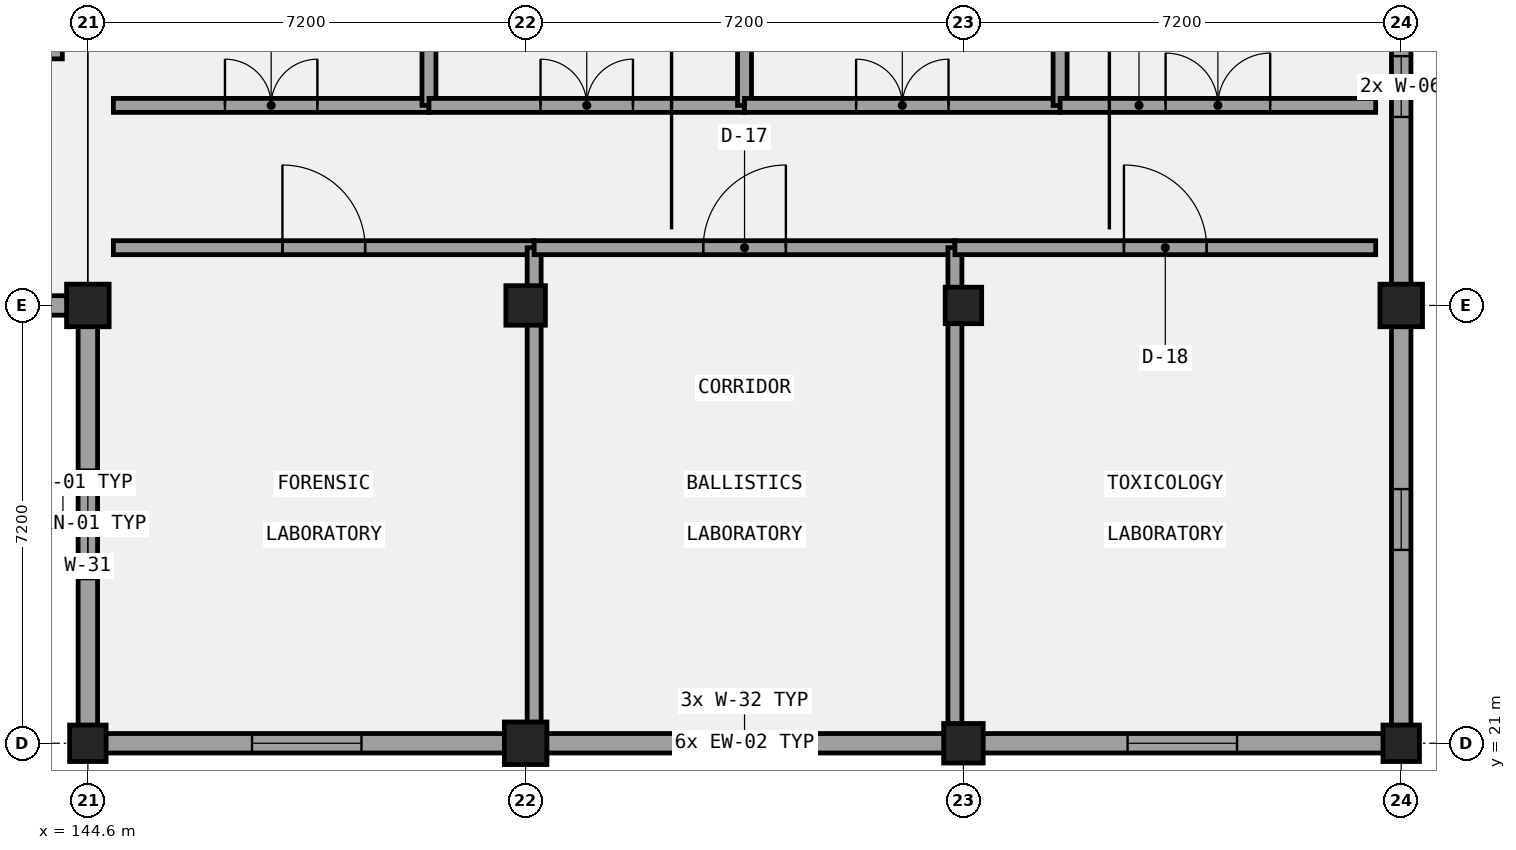
"""IFC4 building model, lengths in metres.
Left out: names, types, materials, properties, quantities, classifications, styles, units other than length and angle.
Written with IfcOpenShell. Run it as: python <this file> out.ifc"""

import sys

from ifc_helpers import new_model, si_unit, direction, frame, frame_2d, origin, origin_2d, place, context, subcontext, project, spatial, rectangle, extrude, element, fill, save


model = new_model("IFC4")
c1 = context("Model", 3, precision=1e-05, world=origin(), true_north=direction((0.0, 1.0)))
c2 = subcontext(c1, "Body", "Model", "MODEL_VIEW")
j1 = project(units=[si_unit("LENGTHUNIT", "METRE"), si_unit("PLANEANGLEUNIT", "RADIAN")], contexts=[c1])
p1 = place(None, origin())
s1 = spatial("IfcSite", under=j1, at=p1, CompositionType="ELEMENT")
p2 = place(p1, origin())
s2 = spatial("IfcBuilding", under=s1, at=p2, CompositionType="ELEMENT")
p3 = place(p2, frame((0.0, 0.0, 9.6)))
s3 = spatial("IfcBuildingStorey", under=s2, at=p3, CompositionType="ELEMENT", Elevation=9.6)
p4 = place(p3, frame((144.6, 21.0, 0.0), z_axis=(0.0, 0.0, 1.0), x_axis=(1.0, 0.0, 0.0)))
e1 = element("IfcColumn", 1, at=p4, inside=s3, PredefinedType="COLUMN", context=c2, shape_type="SweptSolid", body=[
    extrude(rectangle(XDim=0.6, YDim=0.6, at=origin_2d()), origin(), (0.0, 0.0, 1.0), 4.2),
])
for number, where, z_axis, x_axis in (
    (2, (144.6, 28.2, 0.0), (0.0, 0.0, 1.0), (1.0, 0.0, 0.0)),
    (3, (151.8, 21.0, 0.0), (0.0, 0.0, 1.0), (1.0, 0.0, 0.0)),
):
    element("IfcColumn", number, at=place(p3, frame(where, z_axis=z_axis, x_axis=x_axis)), inside=s3, PredefinedType="COLUMN", context=c2, shape_type="SweptSolid", body=[
        extrude(rectangle(XDim=0.7, YDim=0.7, at=origin_2d()), origin(), (0.0, 0.0, 1.0), 4.2),
    ])
for number, where, z_axis, x_axis in (
    (4, (151.8, 28.2, 0.0), (0.0, 0.0, 1.0), (1.0, 0.0, 0.0)),
    (5, (159.0, 21.0, 0.0), (0.0, 0.0, 1.0), (1.0, 0.0, 0.0)),
):
    element("IfcColumn", number, at=place(p3, frame(where, z_axis=z_axis, x_axis=x_axis)), inside=s3, PredefinedType="COLUMN", context=c2, shape_type="SweptSolid", body=[
        extrude(rectangle(XDim=0.65, YDim=0.65, at=origin_2d()), origin(), (0.0, 0.0, 1.0), 4.2),
    ])
for number, where, z_axis, x_axis in (
    (6, (159.0, 28.2, 0.0), (0.0, 0.0, 1.0), (1.0, 0.0, 0.0)),
    (7, (166.2, 21.0, 0.0), (0.0, 0.0, 1.0), (1.0, 0.0, 0.0)),
):
    element("IfcColumn", number, at=place(p3, frame(where, z_axis=z_axis, x_axis=x_axis)), inside=s3, PredefinedType="COLUMN", context=c2, shape_type="SweptSolid", body=[
        extrude(rectangle(XDim=0.6, YDim=0.6, at=origin_2d()), origin(), (0.0, 0.0, 1.0), 4.2),
    ])
p5 = place(p3, frame((166.2, 28.2, 0.0), z_axis=(0.0, 0.0, 1.0), x_axis=(1.0, 0.0, 0.0)))
e8 = element("IfcColumn", 8, at=p5, inside=s3, PredefinedType="COLUMN", context=c2, shape_type="SweptSolid", body=[
    extrude(rectangle(XDim=0.7, YDim=0.7, at=origin_2d()), origin(), (0.0, 0.0, 1.0), 4.2),
])
p6 = place(p3, frame((137.24, 28.2, 0.0), z_axis=(0.0, 0.0, 1.0), x_axis=(1.0, 0.0, 0.0)))
e9 = element("IfcWall", 9, at=p6, inside=s3, PredefinedType="SOLIDWALL", context=c2, shape_type="SweptSolid", body=[
    extrude(rectangle(XDim=7.52, YDim=0.32, at=frame_2d((3.76, 0.0))), origin(), (0.0, 0.0, 1.0), 2.94),
])
p7 = place(p6, frame((2.66, 0.0, 1.0)))
e10 = element("IfcOpeningElement", 10, at=p7, cuts=e9, PredefinedType="OPENING", context=c2, shape_type="SweptSolid", body=[
    extrude(rectangle(XDim=2.2, YDim=1.65, at=frame_2d((1.1, 0.825))), frame((0.0, 0.17, 0.0), z_axis=(0.0, -1.0, 0.0), x_axis=(1.0, 0.0, 0.0)), (0.0, 0.0, 1.0), 0.34),
])
p8 = place(p3, frame((144.6, 28.04, 0.0), z_axis=(0.0, 0.0, 1.0), x_axis=(0.0, -1.0, 0.0)))
e11 = element("IfcWall", 11, at=p8, inside=s3, PredefinedType="SOLIDWALL", context=c2, shape_type="SweptSolid", body=[
    extrude(rectangle(XDim=6.88, YDim=0.32, at=frame_2d((3.44, 0.0))), origin(), (0.0, 0.0, 1.0), 3.19),
])
p9 = place(p8, frame((2.54, 0.0, 1.0)))
e12 = element("IfcOpeningElement", 12, at=p9, cuts=e11, PredefinedType="OPENING", context=c2, shape_type="SweptSolid", body=[
    extrude(rectangle(XDim=1.8, YDim=1.4, at=frame_2d((0.9, 0.7))), frame((0.0, 0.17, 0.0), z_axis=(0.0, -1.0, 0.0), x_axis=(1.0, 0.0, 0.0)), (0.0, 0.0, 1.0), 0.34),
])
p10 = place(p3, frame((144.44, 21.0, 0.0), z_axis=(0.0, 0.0, 1.0), x_axis=(1.0, 0.0, 0.0)))
e13 = element("IfcWall", 13, at=p10, inside=s3, PredefinedType="SOLIDWALL", context=c2, shape_type="SweptSolid", body=[
    extrude(rectangle(XDim=21.92, YDim=0.32, at=frame_2d((10.96, 0.0))), origin(), (0.0, 0.0, 1.0), 3.29),
])
p11 = place(p10, frame((2.86, 0.0, 1.0)))
e14 = element("IfcOpeningElement", 14, at=p11, cuts=e13, PredefinedType="OPENING", context=c2, shape_type="SweptSolid", body=[
    extrude(rectangle(XDim=1.8, YDim=1.65, at=frame_2d((0.9, 0.825))), frame((0.0, 0.17, 0.0), z_axis=(0.0, -1.0, 0.0), x_axis=(1.0, 0.0, 0.0)), (0.0, 0.0, 1.0), 0.34),
])
p12 = place(p10, frame((10.06, 0.0, 1.0)))
e15 = element("IfcOpeningElement", 15, at=p12, cuts=e13, PredefinedType="OPENING", context=c2, shape_type="SweptSolid", body=[
    extrude(rectangle(XDim=1.8, YDim=1.65, at=frame_2d((0.9, 0.825))), frame((0.0, 0.17, 0.0), z_axis=(0.0, -1.0, 0.0), x_axis=(1.0, 0.0, 0.0)), (0.0, 0.0, 1.0), 0.34),
])
p13 = place(p10, frame((17.26, 0.0, 1.0)))
e16 = element("IfcOpeningElement", 16, at=p13, cuts=e13, PredefinedType="OPENING", context=c2, shape_type="SweptSolid", body=[
    extrude(rectangle(XDim=1.8, YDim=1.65, at=frame_2d((0.9, 0.825))), frame((0.0, 0.17, 0.0), z_axis=(0.0, -1.0, 0.0), x_axis=(1.0, 0.0, 0.0)), (0.0, 0.0, 1.0), 0.34),
])
p14 = place(p3, frame((166.2, 21.16, 0.0), z_axis=(0.0, 0.0, 1.0), x_axis=(0.0, 1.0, 0.0)))
e17 = element("IfcWall", 17, at=p14, inside=s3, PredefinedType="SOLIDWALL", context=c2, shape_type="SweptSolid", body=[
    extrude(rectangle(XDim=21.25, YDim=0.32, at=frame_2d((10.625, 0.0))), origin(), (0.0, 0.0, 1.0), 2.94),
])
p15 = place(p14, frame((3.02, 0.0, 1.0)))
e18 = element("IfcOpeningElement", 18, at=p15, cuts=e17, PredefinedType="OPENING", context=c2, shape_type="SweptSolid", body=[
    extrude(rectangle(XDim=1.0, YDim=1.4, at=frame_2d((0.5, 0.7))), frame((0.0, 0.17, 0.0), z_axis=(0.0, -1.0, 0.0), x_axis=(1.0, 0.0, 0.0)), (0.0, 0.0, 1.0), 0.34),
])
p16 = place(p14, frame((10.14, 0.0, 1.0)))
e19 = element("IfcOpeningElement", 19, at=p16, cuts=e17, PredefinedType="OPENING", context=c2, shape_type="SweptSolid", body=[
    extrude(rectangle(XDim=1.0, YDim=1.4, at=frame_2d((0.5, 0.7))), frame((0.0, 0.17, 0.0), z_axis=(0.0, -1.0, 0.0), x_axis=(1.0, 0.0, 0.0)), (0.0, 0.0, 1.0), 0.34),
])
p17 = place(p14, frame((17.245, 0.0, 1.0)))
e20 = element("IfcOpeningElement", 20, at=p17, cuts=e17, PredefinedType="OPENING", context=c2, shape_type="SweptSolid", body=[
    extrude(rectangle(XDim=1.0, YDim=1.4, at=frame_2d((0.5, 0.7))), frame((0.0, 0.17, 0.0), z_axis=(0.0, -1.0, 0.0), x_axis=(1.0, 0.0, 0.0)), (0.0, 0.0, 1.0), 0.34),
])
p18 = place(p3, frame((134.314, 32.36, 0.0), z_axis=(0.0, 0.0, 1.0), x_axis=(1.0, 0.0, 0.0)))
e21 = element("IfcWall", 21, at=p18, inside=s3, PredefinedType="PARTITIONING", context=c2, shape_type="SweptSolid", body=[
    extrude(rectangle(XDim=9.866, YDim=0.21, at=frame_2d((4.933, 0.0))), origin(), (0.0, 0.0, 1.0), 3.94),
])
p19 = place(p18, frame((4.413, 0.0, 0.0)))
e22 = element("IfcOpeningElement", 22, at=p19, cuts=e21, PredefinedType="OPENING", context=c2, shape_type="SweptSolid", body=[
    extrude(rectangle(XDim=1.04, YDim=2.1, at=frame_2d((0.52, 1.05))), frame((0.0, 0.115, 0.0), z_axis=(0.0, -1.0, 0.0), x_axis=(1.0, 0.0, 0.0)), (0.0, 0.0, 1.0), 0.23),
])
p20 = place(p3, frame((145.02, 29.15, 0.0), z_axis=(0.0, 0.0, 1.0), x_axis=(1.0, 0.0, 0.0)))
e23 = element("IfcWall", 23, at=p20, inside=s3, PredefinedType="PARTITIONING", context=c2, shape_type="SweptSolid", body=[
    extrude(rectangle(XDim=6.92, YDim=0.23, at=frame_2d((3.46, 0.0))), origin(), (0.0, 0.0, 1.0), 3.94),
])
p21 = place(p20, frame((2.78, 0.0, 0.0)))
e24 = element("IfcOpeningElement", 24, at=p21, cuts=e23, PredefinedType="OPENING", context=c2, shape_type="SweptSolid", body=[
    extrude(rectangle(XDim=1.36, YDim=2.1, at=frame_2d((0.68, 1.05))), frame((0.0, 0.125, 0.0), z_axis=(0.0, -1.0, 0.0), x_axis=(1.0, 0.0, 0.0)), (0.0, 0.0, 1.0), 0.25),
])
p22 = place(p3, frame((151.94, 21.18, 0.0), z_axis=(0.0, 0.0, 1.0), x_axis=(0.0, 1.0, 0.0)))
e25 = element("IfcWall", 25, at=p22, inside=s3, PredefinedType="PARTITIONING", context=c2, shape_type="SweptSolid", body=[
    extrude(rectangle(XDim=7.97, YDim=0.23, at=frame_2d((3.985, 0.0))), origin(), (0.0, 0.0, 1.0), 3.14),
])
p23 = place(p3, frame((151.94, 29.15, 0.0), z_axis=(0.0, 0.0, 1.0), x_axis=(1.0, 0.0, 0.0)))
e26 = element("IfcWall", 26, at=p23, inside=s3, PredefinedType="PARTITIONING", context=c2, shape_type="SweptSolid", body=[
    extrude(rectangle(XDim=6.92, YDim=0.23, at=frame_2d((3.46, 0.0))), origin(), (0.0, 0.0, 1.0), 3.94),
])
p24 = place(p23, frame((2.78, 0.0, 0.0)))
e27 = element("IfcOpeningElement", 27, at=p24, cuts=e26, PredefinedType="OPENING", context=c2, shape_type="SweptSolid", body=[
    extrude(rectangle(XDim=1.36, YDim=2.22, at=frame_2d((0.68, 1.11))), frame((0.0, 0.125, 0.0), z_axis=(0.0, -1.0, 0.0), x_axis=(1.0, 0.0, 0.0)), (0.0, 0.0, 1.0), 0.25),
])
p25 = place(p3, frame((158.86, 21.18, 0.0), z_axis=(0.0, 0.0, 1.0), x_axis=(0.0, 1.0, 0.0)))
e28 = element("IfcWall", 28, at=p25, inside=s3, PredefinedType="PARTITIONING", context=c2, shape_type="SweptSolid", body=[
    extrude(rectangle(XDim=7.97, YDim=0.23, at=frame_2d((3.985, 0.0))), origin(), (0.0, 0.0, 1.0), 3.09),
])
p26 = place(p3, frame((158.86, 29.15, 0.0), z_axis=(0.0, 0.0, 1.0), x_axis=(1.0, 0.0, 0.0)))
e29 = element("IfcWall", 29, at=p26, inside=s3, PredefinedType="PARTITIONING", context=c2, shape_type="SweptSolid", body=[
    extrude(rectangle(XDim=6.92, YDim=0.23, at=frame_2d((3.46, 0.0))), origin(), (0.0, 0.0, 1.0), 3.94),
])
p27 = place(p26, frame((2.78, 0.0, 0.0)))
e30 = element("IfcOpeningElement", 30, at=p27, cuts=e29, PredefinedType="OPENING", context=c2, shape_type="SweptSolid", body=[
    extrude(rectangle(XDim=1.36, YDim=2.35, at=frame_2d((0.68, 1.175))), frame((0.0, 0.125, 0.0), z_axis=(0.0, -1.0, 0.0), x_axis=(1.0, 0.0, 0.0)), (0.0, 0.0, 1.0), 0.25),
])
p28 = place(p3, frame((145.02, 31.49, 0.0), z_axis=(0.0, 0.0, 1.0), x_axis=(1.0, 0.0, 0.0)))
e31 = element("IfcWall", 31, at=p28, inside=s3, PredefinedType="PARTITIONING", context=c2, shape_type="SweptSolid", body=[
    extrude(rectangle(XDim=5.19, YDim=0.23, at=frame_2d((2.595, 0.0))), origin(), (0.0, 0.0, 1.0), 3.39),
])
p29 = place(p28, frame((1.835, 0.0, 0.0)))
e32 = element("IfcOpeningElement", 32, at=p29, cuts=e31, PredefinedType="OPENING", context=c2, shape_type="SweptSolid", body=[
    extrude(rectangle(XDim=1.52, YDim=2.1, at=frame_2d((0.76, 1.05))), frame((0.0, 0.125, 0.0), z_axis=(0.0, -1.0, 0.0), x_axis=(1.0, 0.0, 0.0)), (0.0, 0.0, 1.0), 0.25),
])
p30 = place(p3, frame((150.21, 31.49, 0.0), z_axis=(0.0, 0.0, 1.0), x_axis=(0.0, 1.0, 0.0)))
e33 = element("IfcWall", 33, at=p30, inside=s3, PredefinedType="PARTITIONING", context=c2, shape_type="SweptSolid", body=[
    extrude(rectangle(XDim=8.11, YDim=0.23, at=frame_2d((4.055, 0.0))), origin(), (0.0, 0.0, 1.0), 3.94),
])
p31 = place(p3, frame((150.21, 31.49, 0.0), z_axis=(0.0, 0.0, 1.0), x_axis=(1.0, 0.0, 0.0)))
e34 = element("IfcWall", 34, at=p31, inside=s3, PredefinedType="PARTITIONING", context=c2, shape_type="SweptSolid", body=[
    extrude(rectangle(XDim=5.19, YDim=0.23, at=frame_2d((2.595, 0.0))), origin(), (0.0, 0.0, 1.0), 3.39),
])
p32 = place(p31, frame((1.835, 0.0, 0.0)))
e35 = element("IfcOpeningElement", 35, at=p32, cuts=e34, PredefinedType="OPENING", context=c2, shape_type="SweptSolid", body=[
    extrude(rectangle(XDim=1.52, YDim=2.22, at=frame_2d((0.76, 1.11))), frame((0.0, 0.125, 0.0), z_axis=(0.0, -1.0, 0.0), x_axis=(1.0, 0.0, 0.0)), (0.0, 0.0, 1.0), 0.25),
])
p33 = place(p3, frame((155.4, 31.49, 0.0), z_axis=(0.0, 0.0, 1.0), x_axis=(0.0, 1.0, 0.0)))
e36 = element("IfcWall", 36, at=p33, inside=s3, PredefinedType="PARTITIONING", context=c2, shape_type="SweptSolid", body=[
    extrude(rectangle(XDim=8.11, YDim=0.23, at=frame_2d((4.055, 0.0))), origin(), (0.0, 0.0, 1.0), 3.94),
])
p34 = place(p3, frame((155.4, 31.49, 0.0), z_axis=(0.0, 0.0, 1.0), x_axis=(1.0, 0.0, 0.0)))
e37 = element("IfcWall", 37, at=p34, inside=s3, PredefinedType="PARTITIONING", context=c2, shape_type="SweptSolid", body=[
    extrude(rectangle(XDim=5.19, YDim=0.23, at=frame_2d((2.595, 0.0))), origin(), (0.0, 0.0, 1.0), 3.39),
])
p35 = place(p34, frame((1.835, 0.0, 0.0)))
e38 = element("IfcOpeningElement", 38, at=p35, cuts=e37, PredefinedType="OPENING", context=c2, shape_type="SweptSolid", body=[
    extrude(rectangle(XDim=1.52, YDim=2.35, at=frame_2d((0.76, 1.175))), frame((0.0, 0.125, 0.0), z_axis=(0.0, -1.0, 0.0), x_axis=(1.0, 0.0, 0.0)), (0.0, 0.0, 1.0), 0.25),
])
p36 = place(p3, frame((160.59, 31.49, 0.0), z_axis=(0.0, 0.0, 1.0), x_axis=(0.0, 1.0, 0.0)))
e39 = element("IfcWall", 39, at=p36, inside=s3, PredefinedType="PARTITIONING", context=c2, shape_type="SweptSolid", body=[
    extrude(rectangle(XDim=8.11, YDim=0.23, at=frame_2d((4.055, 0.0))), origin(), (0.0, 0.0, 1.0), 3.94),
])
p37 = place(p3, frame((160.59, 31.49, 0.0), z_axis=(0.0, 0.0, 1.0), x_axis=(1.0, 0.0, 0.0)))
e40 = element("IfcWall", 40, at=p37, inside=s3, PredefinedType="PARTITIONING", context=c2, shape_type="SweptSolid", body=[
    extrude(rectangle(XDim=5.19, YDim=0.23, at=frame_2d((2.595, 0.0))), origin(), (0.0, 0.0, 1.0), 3.39),
])
p38 = place(p37, frame((1.735, 0.0, 0.0)))
e41 = element("IfcOpeningElement", 41, at=p38, cuts=e40, PredefinedType="OPENING", context=c2, shape_type="SweptSolid", body=[
    extrude(rectangle(XDim=1.72, YDim=2.1, at=frame_2d((0.86, 1.05))), frame((0.0, 0.125, 0.0), z_axis=(0.0, -1.0, 0.0), x_axis=(1.0, 0.0, 0.0)), (0.0, 0.0, 1.0), 0.25),
])
p39 = place(p9, origin())
e42 = element("IfcWindow", 42, at=p39, inside=s3, PartitioningType="SINGLE_PANEL", PredefinedType="WINDOW", context=c2, shape_type="SweptSolid", body=[
    extrude(rectangle(XDim=1.8, YDim=1.4, at=frame_2d((0.9, 0.7))), frame((0.0, 0.03, 0.0), z_axis=(0.0, -1.0, 0.0), x_axis=(1.0, 0.0, 0.0)), (0.0, 0.0, 1.0), 0.06),
])
fill(e12, e42)
p40 = place(p11, origin())
e43 = element("IfcWindow", 43, at=p40, inside=s3, PartitioningType="SINGLE_PANEL", PredefinedType="WINDOW", context=c2, shape_type="SweptSolid", body=[
    extrude(rectangle(XDim=1.8, YDim=1.65, at=frame_2d((0.9, 0.825))), frame((0.0, 0.03, 0.0), z_axis=(0.0, -1.0, 0.0), x_axis=(1.0, 0.0, 0.0)), (0.0, 0.0, 1.0), 0.06),
])
fill(e14, e43)
p41 = place(p12, origin())
e44 = element("IfcWindow", 44, at=p41, inside=s3, PartitioningType="SINGLE_PANEL", PredefinedType="WINDOW", context=c2, shape_type="SweptSolid", body=[
    extrude(rectangle(XDim=1.8, YDim=1.65, at=frame_2d((0.9, 0.825))), frame((0.0, 0.03, 0.0), z_axis=(0.0, -1.0, 0.0), x_axis=(1.0, 0.0, 0.0)), (0.0, 0.0, 1.0), 0.06),
])
fill(e15, e44)
p42 = place(p13, origin())
e45 = element("IfcWindow", 45, at=p42, inside=s3, PartitioningType="SINGLE_PANEL", PredefinedType="WINDOW", context=c2, shape_type="SweptSolid", body=[
    extrude(rectangle(XDim=1.8, YDim=1.65, at=frame_2d((0.9, 0.825))), frame((0.0, 0.03, 0.0), z_axis=(0.0, -1.0, 0.0), x_axis=(1.0, 0.0, 0.0)), (0.0, 0.0, 1.0), 0.06),
])
fill(e16, e45)
p43 = place(p15, origin())
e46 = element("IfcWindow", 46, at=p43, inside=s3, PartitioningType="SINGLE_PANEL", PredefinedType="WINDOW", context=c2, shape_type="SweptSolid", body=[
    extrude(rectangle(XDim=1.0, YDim=1.4, at=frame_2d((0.5, 0.7))), frame((0.0, 0.03, 0.0), z_axis=(0.0, -1.0, 0.0), x_axis=(1.0, 0.0, 0.0)), (0.0, 0.0, 1.0), 0.06),
])
fill(e18, e46)
p44 = place(p16, origin())
e47 = element("IfcWindow", 47, at=p44, inside=s3, PartitioningType="SINGLE_PANEL", PredefinedType="WINDOW", context=c2, shape_type="SweptSolid", body=[
    extrude(rectangle(XDim=1.0, YDim=1.4, at=frame_2d((0.5, 0.7))), frame((0.0, 0.03, 0.0), z_axis=(0.0, -1.0, 0.0), x_axis=(1.0, 0.0, 0.0)), (0.0, 0.0, 1.0), 0.06),
])
fill(e19, e47)
p45 = place(p21, frame((1.36, 0.0, 0.0), z_axis=(0.0, 0.0, 1.0), x_axis=(-1.0, 0.0, 0.0)))
e48 = element("IfcDoor", 48, at=p45, inside=s3, OperationType="SINGLE_SWING_LEFT", PredefinedType="DOOR", context=c2, shape_type="SweptSolid", body=[
    extrude(rectangle(XDim=1.36, YDim=2.1, at=frame_2d((0.68, 1.05))), frame((0.0, 0.025, 0.0), z_axis=(0.0, -1.0, 0.0), x_axis=(1.0, 0.0, 0.0)), (0.0, 0.0, 1.0), 0.05),
])
fill(e24, e48)
p46 = place(p24, frame((1.36, 0.0, 0.0), z_axis=(0.0, 0.0, 1.0), x_axis=(-1.0, 0.0, 0.0)))
e49 = element("IfcDoor", 49, at=p46, inside=s3, OperationType="SINGLE_SWING_RIGHT", PredefinedType="DOOR", context=c2, shape_type="SweptSolid", body=[
    extrude(rectangle(XDim=1.36, YDim=2.22, at=frame_2d((0.68, 1.11))), frame((0.0, 0.025, 0.0), z_axis=(0.0, -1.0, 0.0), x_axis=(1.0, 0.0, 0.0)), (0.0, 0.0, 1.0), 0.05),
])
fill(e27, e49)
p47 = place(p27, frame((1.36, 0.0, 0.0), z_axis=(0.0, 0.0, 1.0), x_axis=(-1.0, 0.0, 0.0)))
e50 = element("IfcDoor", 50, at=p47, inside=s3, OperationType="SINGLE_SWING_LEFT", PredefinedType="DOOR", context=c2, shape_type="SweptSolid", body=[
    extrude(rectangle(XDim=1.36, YDim=2.35, at=frame_2d((0.68, 1.175))), frame((0.0, 0.025, 0.0), z_axis=(0.0, -1.0, 0.0), x_axis=(1.0, 0.0, 0.0)), (0.0, 0.0, 1.0), 0.05),
])
fill(e30, e50)
p48 = place(p29, origin())
e51 = element("IfcDoor", 51, at=p48, inside=s3, OperationType="DOUBLE_DOOR_SINGLE_SWING", PredefinedType="DOOR", context=c2, shape_type="SweptSolid", body=[
    extrude(rectangle(XDim=1.52, YDim=2.1, at=frame_2d((0.76, 1.05))), frame((0.0, 0.025, 0.0), z_axis=(0.0, -1.0, 0.0), x_axis=(1.0, 0.0, 0.0)), (0.0, 0.0, 1.0), 0.05),
])
fill(e32, e51)
p49 = place(p32, origin())
e52 = element("IfcDoor", 52, at=p49, inside=s3, OperationType="DOUBLE_DOOR_SINGLE_SWING", PredefinedType="DOOR", context=c2, shape_type="SweptSolid", body=[
    extrude(rectangle(XDim=1.52, YDim=2.22, at=frame_2d((0.76, 1.11))), frame((0.0, 0.025, 0.0), z_axis=(0.0, -1.0, 0.0), x_axis=(1.0, 0.0, 0.0)), (0.0, 0.0, 1.0), 0.05),
])
fill(e35, e52)
p50 = place(p35, origin())
e53 = element("IfcDoor", 53, at=p50, inside=s3, OperationType="DOUBLE_DOOR_SINGLE_SWING", PredefinedType="DOOR", context=c2, shape_type="SweptSolid", body=[
    extrude(rectangle(XDim=1.52, YDim=2.35, at=frame_2d((0.76, 1.175))), frame((0.0, 0.025, 0.0), z_axis=(0.0, -1.0, 0.0), x_axis=(1.0, 0.0, 0.0)), (0.0, 0.0, 1.0), 0.05),
])
fill(e38, e53)
p51 = place(p38, origin())
e54 = element("IfcDoor", 54, at=p51, inside=s3, OperationType="DOUBLE_DOOR_SINGLE_SWING", PredefinedType="DOOR", context=c2, shape_type="SweptSolid", body=[
    extrude(rectangle(XDim=1.72, YDim=2.1, at=frame_2d((0.86, 1.05))), frame((0.0, 0.025, 0.0), z_axis=(0.0, -1.0, 0.0), x_axis=(1.0, 0.0, 0.0)), (0.0, 0.0, 1.0), 0.05),
])
fill(e41, e54)
save(model, sys.argv[1])
